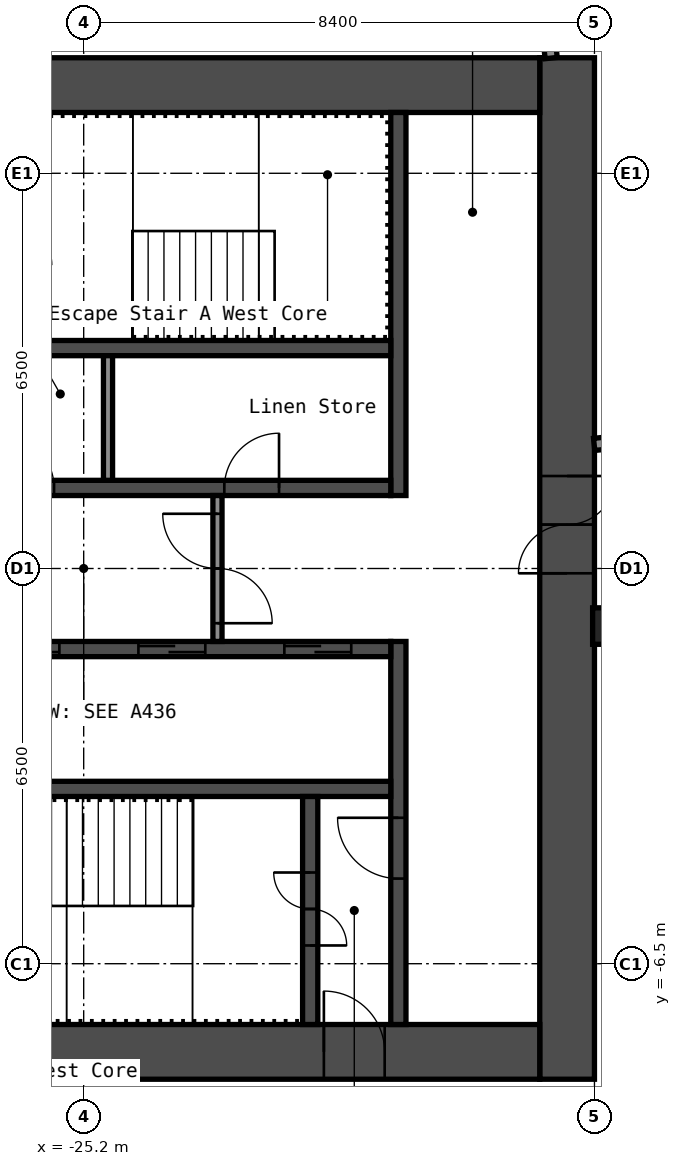
"""IFC4 building model, lengths in metres.
Left out: names, types, materials, properties, quantities, classifications, styles, units other than length and angle.
Written with IfcOpenShell. Run it as: python <this file> out.ifc"""

import sys

from ifc_helpers import new_model, si_unit, direction, frame, frame_2d, origin, origin_2d, place, context, subcontext, project, spatial, rectangle, hollow_rectangle, extrude, element, fill, save


model = new_model("IFC4")
c1 = context("Model", 3, precision=1e-05, world=origin(), true_north=direction((0.0, 1.0)))
c2 = subcontext(c1, "Body", "Model", "MODEL_VIEW")
j1 = project(units=[si_unit("LENGTHUNIT", "METRE"), si_unit("PLANEANGLEUNIT", "RADIAN")], contexts=[c1])
p1 = place(None, origin())
s1 = spatial("IfcSite", under=j1, at=p1, CompositionType="ELEMENT")
p2 = place(p1, origin())
s2 = spatial("IfcBuilding", under=s1, at=p2, CompositionType="ELEMENT")
p3 = place(p2, frame((0.0, 0.0, 248.6)))
s3 = spatial("IfcBuildingStorey", under=s2, at=p3, CompositionType="ELEMENT", Elevation=248.6)
p4 = place(p3, frame((-16.53, -0.947, 0.0), z_axis=(0.0, 0.0, 1.0), x_axis=(1.0, 0.0, 0.0)))
e1 = element("IfcColumn", 1, at=p4, inside=s3, PredefinedType="COLUMN", context=c2, shape_type="SweptSolid", body=[
    extrude(hollow_rectangle(XDim=0.6, YDim=0.6, WallThickness=0.025, InnerFilletRadius=0.038, OuterFilletRadius=0.062, at=origin_2d()), origin(), (0.0, 0.0, 1.0), 2.75),
])
p5 = place(p3, frame((-17.25, -8.4, 0.0), z_axis=(0.0, 0.0, 1.0), x_axis=(0.0, 1.0, 0.0)))
e2 = element("IfcWall", 2, at=p5, inside=s3, PredefinedType="SHEAR", context=c2, shape_type="SweptSolid", body=[
    extrude(rectangle(XDim=16.8, YDim=0.9, at=frame_2d((8.4, 0.0))), origin(), (0.0, 0.0, 1.0), 2.75),
])
p6 = place(p5, frame((8.321, 0.0, 0.0)))
e3 = element("IfcOpeningElement", 3, at=p6, cuts=e2, PredefinedType="OPENING", context=c2, shape_type="SweptSolid", body=[
    extrude(rectangle(XDim=1.6, YDim=2.1, at=frame_2d((0.8, 1.05))), frame((0.0, 0.46, 0.0), z_axis=(0.0, -1.0, 0.0), x_axis=(1.0, 0.0, 0.0)), (0.0, 0.0, 1.0), 0.92),
])
p7 = place(p3, frame((-32.7, 7.95, 0.0), z_axis=(0.0, 0.0, 1.0), x_axis=(1.0, 0.0, 0.0)))
e4 = element("IfcWall", 4, at=p7, inside=s3, PredefinedType="SHEAR", context=c2, shape_type="SweptSolid", body=[
    extrude(rectangle(XDim=15.0, YDim=0.9, at=frame_2d((7.5, 0.0))), origin(), (0.0, 0.0, 1.0), 2.75),
])
p8 = place(p7, frame((3.4, 0.0, 0.0)))
e5 = element("IfcOpeningElement", 5, at=p8, cuts=e4, PredefinedType="OPENING", context=c2, shape_type="SweptSolid", body=[
    extrude(rectangle(XDim=1.2, YDim=2.1, at=frame_2d((0.6, 1.05))), frame((0.0, 0.46, 0.0), z_axis=(0.0, -1.0, 0.0), x_axis=(1.0, 0.0, 0.0)), (0.0, 0.0, 1.0), 0.92),
])
p9 = place(p7, frame((0.75, 0.0, 0.0)))
e6 = element("IfcOpeningElement", 6, at=p9, cuts=e4, PredefinedType="OPENING", context=c2, shape_type="SweptSolid", body=[
    extrude(rectangle(XDim=0.9, YDim=2.1, at=frame_2d((0.45, 1.05))), frame((0.0, 0.46, 0.0), z_axis=(0.0, -1.0, 0.0), x_axis=(1.0, 0.0, 0.0)), (0.0, 0.0, 1.0), 0.92),
])
p10 = place(p3, frame((-32.7, -7.95, 0.0), z_axis=(0.0, 0.0, 1.0), x_axis=(1.0, 0.0, 0.0)))
e7 = element("IfcWall", 7, at=p10, inside=s3, PredefinedType="SHEAR", context=c2, shape_type="SweptSolid", body=[
    extrude(rectangle(XDim=15.0, YDim=0.9, at=frame_2d((7.5, 0.0))), origin(), (0.0, 0.0, 1.0), 2.75),
])
p11 = place(p10, frame((11.45, 0.0, 0.0)))
e8 = element("IfcOpeningElement", 8, at=p11, cuts=e7, PredefinedType="OPENING", context=c2, shape_type="SweptSolid", body=[
    extrude(rectangle(XDim=1.0, YDim=2.1, at=frame_2d((0.5, 1.05))), frame((0.0, 0.46, 0.0), z_axis=(0.0, -1.0, 0.0), x_axis=(1.0, 0.0, 0.0)), (0.0, 0.0, 1.0), 0.92),
])
p12 = place(p3, frame((-20.025, 1.2, 0.0), z_axis=(0.0, 0.0, 1.0), x_axis=(0.0, 1.0, 0.0)))
e9 = element("IfcWall", 9, at=p12, inside=s3, PredefinedType="SHEAR", context=c2, shape_type="SweptSolid", body=[
    extrude(rectangle(XDim=6.3, YDim=0.25, at=frame_2d((3.15, 0.0))), origin(), (0.0, 0.0, 1.0), 2.75),
])
p13 = place(p3, frame((-20.025, -7.5, 0.0), z_axis=(0.0, 0.0, 1.0), x_axis=(0.0, 1.0, 0.0)))
e10 = element("IfcWall", 10, at=p13, inside=s3, PredefinedType="SHEAR", context=c2, shape_type="SweptSolid", body=[
    extrude(rectangle(XDim=6.3, YDim=0.25, at=frame_2d((3.15, 0.0))), origin(), (0.0, 0.0, 1.0), 2.75),
])
p14 = place(p13, frame((2.4, 0.0, 0.0)))
e11 = element("IfcOpeningElement", 11, at=p14, cuts=e10, PredefinedType="OPENING", context=c2, shape_type="SweptSolid", body=[
    extrude(rectangle(XDim=1.0, YDim=2.1, at=frame_2d((0.5, 1.05))), frame((0.0, 0.135, 0.0), z_axis=(0.0, -1.0, 0.0), x_axis=(1.0, 0.0, 0.0)), (0.0, 0.0, 1.0), 0.27),
])
p15 = place(p3, frame((-27.65, 1.325, 0.0), z_axis=(0.0, 0.0, 1.0), x_axis=(1.0, 0.0, 0.0)))
e12 = element("IfcWall", 12, at=p15, inside=s3, PredefinedType="SHEAR", context=c2, shape_type="SweptSolid", body=[
    extrude(rectangle(XDim=7.5, YDim=0.25, at=frame_2d((3.75, 0.0))), origin(), (0.0, 0.0, 1.0), 2.75),
])
p16 = place(p15, frame((4.762, 0.0, 0.0)))
e13 = element("IfcOpeningElement", 13, at=p16, cuts=e12, PredefinedType="OPENING", context=c2, shape_type="SweptSolid", body=[
    extrude(rectangle(XDim=0.9, YDim=2.1, at=frame_2d((0.45, 1.05))), frame((0.0, 0.135, 0.0), z_axis=(0.0, -1.0, 0.0), x_axis=(1.0, 0.0, 0.0)), (0.0, 0.0, 1.0), 0.27),
])
p17 = place(p15, frame((1.062, 0.0, 0.0)))
e14 = element("IfcOpeningElement", 14, at=p17, cuts=e12, PredefinedType="OPENING", context=c2, shape_type="SweptSolid", body=[
    extrude(rectangle(XDim=0.9, YDim=2.1, at=frame_2d((0.45, 1.05))), frame((0.0, 0.135, 0.0), z_axis=(0.0, -1.0, 0.0), x_axis=(1.0, 0.0, 0.0)), (0.0, 0.0, 1.0), 0.27),
])
p18 = place(p3, frame((-27.65, 3.625, 0.0), z_axis=(0.0, 0.0, 1.0), x_axis=(1.0, 0.0, 0.0)))
e15 = element("IfcWall", 15, at=p18, inside=s3, PredefinedType="SHEAR", context=c2, shape_type="SweptSolid", body=[
    extrude(rectangle(XDim=7.5, YDim=0.25, at=frame_2d((3.75, 0.0))), origin(), (0.0, 0.0, 1.0), 2.75),
])
p19 = place(p3, frame((-27.65, -1.325, 0.0), z_axis=(0.0, 0.0, 1.0), x_axis=(1.0, 0.0, 0.0)))
e16 = element("IfcWall", 16, at=p19, inside=s3, PredefinedType="SHEAR", context=c2, shape_type="SweptSolid", body=[
    extrude(rectangle(XDim=7.5, YDim=0.25, at=frame_2d((3.75, 0.0))), origin(), (0.0, 0.0, 1.0), 2.75),
])
p20 = place(p19, frame((5.75, 0.0, 0.0)))
e17 = element("IfcOpeningElement", 17, at=p20, cuts=e16, PredefinedType="OPENING", context=c2, shape_type="SweptSolid", body=[
    extrude(rectangle(XDim=1.1, YDim=2.1, at=frame_2d((0.55, 1.05))), frame((0.0, 0.135, 0.0), z_axis=(0.0, -1.0, 0.0), x_axis=(1.0, 0.0, 0.0)), (0.0, 0.0, 1.0), 0.27),
])
p21 = place(p19, frame((3.35, 0.0, 0.0)))
e18 = element("IfcOpeningElement", 18, at=p21, cuts=e16, PredefinedType="OPENING", context=c2, shape_type="SweptSolid", body=[
    extrude(rectangle(XDim=1.1, YDim=2.1, at=frame_2d((0.55, 1.05))), frame((0.0, 0.135, 0.0), z_axis=(0.0, -1.0, 0.0), x_axis=(1.0, 0.0, 0.0)), (0.0, 0.0, 1.0), 0.27),
])
p22 = place(p19, frame((0.95, 0.0, 0.0)))
e19 = element("IfcOpeningElement", 19, at=p22, cuts=e16, PredefinedType="OPENING", context=c2, shape_type="SweptSolid", body=[
    extrude(rectangle(XDim=1.1, YDim=2.1, at=frame_2d((0.55, 1.05))), frame((0.0, 0.135, 0.0), z_axis=(0.0, -1.0, 0.0), x_axis=(1.0, 0.0, 0.0)), (0.0, 0.0, 1.0), 0.27),
])
p23 = place(p3, frame((-27.65, -3.625, 0.0), z_axis=(0.0, 0.0, 1.0), x_axis=(1.0, 0.0, 0.0)))
e20 = element("IfcWall", 20, at=p23, inside=s3, PredefinedType="SHEAR", context=c2, shape_type="SweptSolid", body=[
    extrude(rectangle(XDim=7.5, YDim=0.25, at=frame_2d((3.75, 0.0))), origin(), (0.0, 0.0, 1.0), 2.75),
])
p24 = place(p3, frame((-21.475, -7.5, 0.0), z_axis=(0.0, 0.0, 1.0), x_axis=(0.0, 1.0, 0.0)))
e21 = element("IfcWall", 21, at=p24, inside=s3, PredefinedType="SHEAR", context=c2, shape_type="SweptSolid", body=[
    extrude(rectangle(XDim=3.75, YDim=0.25, at=frame_2d((1.875, 0.0))), origin(), (0.0, 0.0, 1.0), 2.75),
])
p25 = place(p24, frame((1.3, 0.0, 0.0)))
e22 = element("IfcOpeningElement", 22, at=p25, cuts=e21, PredefinedType="OPENING", context=c2, shape_type="SweptSolid", body=[
    extrude(rectangle(XDim=1.2, YDim=2.1, at=frame_2d((0.6, 1.05))), frame((0.0, 0.135, 0.0), z_axis=(0.0, -1.0, 0.0), x_axis=(1.0, 0.0, 0.0)), (0.0, 0.0, 1.0), 0.27),
])
p26 = place(p3, frame((-23.0, -1.2, 0.0), z_axis=(0.0, 0.0, 1.0), x_axis=(0.0, 1.0, 0.0)))
e23 = element("IfcWall", 23, at=p26, inside=s3, PredefinedType="PARTITIONING", context=c2, shape_type="SweptSolid", body=[
    extrude(rectangle(XDim=2.4, YDim=0.15, at=frame_2d((1.2, 0.0))), origin(), (0.0, 0.0, 1.0), 2.75),
])
p27 = place(p26, frame((0.3, 0.0, 0.0)))
e24 = element("IfcOpeningElement", 24, at=p27, cuts=e23, PredefinedType="OPENING", context=c2, shape_type="SweptSolid", body=[
    extrude(rectangle(XDim=1.8, YDim=2.1, at=frame_2d((0.9, 1.05))), frame((0.0, 0.085, 0.0), z_axis=(0.0, -1.0, 0.0), x_axis=(1.0, 0.0, 0.0)), (0.0, 0.0, 1.0), 0.17),
])
p28 = place(p3, frame((-24.8, 1.45, 0.0), z_axis=(0.0, 0.0, 1.0), x_axis=(0.0, 1.0, 0.0)))
e25 = element("IfcWall", 25, at=p28, inside=s3, PredefinedType="PARTITIONING", context=c2, shape_type="SweptSolid", body=[
    extrude(rectangle(XDim=2.05, YDim=0.15, at=frame_2d((1.025, 0.0))), origin(), (0.0, 0.0, 1.0), 2.75),
])
p29 = place(p3, frame((-16.805, 2.041, 0.0), z_axis=(0.0, 0.0, 1.0), x_axis=(0.994521146831, 0.104535584879, 0.0)))
e26 = element("IfcWall", 26, at=p29, inside=s3, PredefinedType="PARTITIONING", context=c2, shape_type="SweptSolid", body=[
    extrude(rectangle(XDim=33.561, YDim=0.2, at=frame_2d((16.78, 0.0))), origin(), (0.0, 0.0, 1.0), 2.75),
])
p30 = place(p29, frame((3.661, 0.0, 0.0)))
e27 = element("IfcOpeningElement", 27, at=p30, cuts=e26, PredefinedType="OPENING", context=c2, shape_type="SweptSolid", body=[
    extrude(rectangle(XDim=1.0, YDim=2.1, at=frame_2d((0.5, 1.05))), frame((0.0, 0.11, 0.0), z_axis=(0.0, -1.0, 0.0), x_axis=(1.0, 0.0, 0.0)), (0.0, 0.0, 1.0), 0.22),
])
p31 = place(p29, frame((13.761, 0.0, 0.0)))
e28 = element("IfcOpeningElement", 28, at=p31, cuts=e26, PredefinedType="OPENING", context=c2, shape_type="SweptSolid", body=[
    extrude(rectangle(XDim=1.0, YDim=2.1, at=frame_2d((0.5, 1.05))), frame((0.0, 0.11, 0.0), z_axis=(0.0, -1.0, 0.0), x_axis=(1.0, 0.0, 0.0)), (0.0, 0.0, 1.0), 0.22),
])
p32 = place(p29, frame((19.611, 0.0, 0.0)))
e29 = element("IfcOpeningElement", 29, at=p32, cuts=e26, PredefinedType="OPENING", context=c2, shape_type="SweptSolid", body=[
    extrude(rectangle(XDim=1.0, YDim=2.1, at=frame_2d((0.5, 1.05))), frame((0.0, 0.11, 0.0), z_axis=(0.0, -1.0, 0.0), x_axis=(1.0, 0.0, 0.0)), (0.0, 0.0, 1.0), 0.22),
])
p33 = place(p29, frame((21.311, 0.0, 0.0)))
e30 = element("IfcOpeningElement", 30, at=p33, cuts=e26, PredefinedType="OPENING", context=c2, shape_type="SweptSolid", body=[
    extrude(rectangle(XDim=1.0, YDim=2.1, at=frame_2d((0.5, 1.05))), frame((0.0, 0.11, 0.0), z_axis=(0.0, -1.0, 0.0), x_axis=(1.0, 0.0, 0.0)), (0.0, 0.0, 1.0), 0.22),
])
p34 = place(p29, frame((28.861, 0.0, 0.0)))
e31 = element("IfcOpeningElement", 31, at=p34, cuts=e26, PredefinedType="OPENING", context=c2, shape_type="SweptSolid", body=[
    extrude(rectangle(XDim=1.0, YDim=2.1, at=frame_2d((0.5, 1.05))), frame((0.0, 0.11, 0.0), z_axis=(0.0, -1.0, 0.0), x_axis=(1.0, 0.0, 0.0)), (0.0, 0.0, 1.0), 0.22),
])
p35 = place(p3, frame((-17.512, 8.395, 0.0), z_axis=(0.0, 0.0, 1.0), x_axis=(-0.104524714473, 0.994522289375, 0.0)))
e32 = element("IfcWall", 32, at=p35, inside=s3, PredefinedType="PARTITIONING", context=c2, shape_type="SweptSolid", body=[
    extrude(rectangle(XDim=9.607, YDim=0.2, at=frame_2d((4.803, 0.0))), origin(), (0.0, 0.0, 1.0), 2.75),
])
p36 = place(p6, origin())
e33 = element("IfcDoor", 33, at=p36, inside=s3, OperationType="DOUBLE_DOOR_SINGLE_SWING", PredefinedType="DOOR", context=c2, shape_type="SweptSolid", body=[
    extrude(rectangle(XDim=1.6, YDim=2.1, at=frame_2d((0.8, 1.05))), frame((0.0, 0.025, 0.0), z_axis=(0.0, -1.0, 0.0), x_axis=(1.0, 0.0, 0.0)), (0.0, 0.0, 1.0), 0.05),
])
fill(e3, e33)
p37 = place(p11, origin())
e34 = element("IfcDoor", 34, at=p37, inside=s3, OperationType="SINGLE_SWING_RIGHT", PredefinedType="DOOR", context=c2, shape_type="SweptSolid", body=[
    extrude(rectangle(XDim=1.0, YDim=2.1, at=frame_2d((0.5, 1.05))), frame((0.0, 0.025, 0.0), z_axis=(0.0, -1.0, 0.0), x_axis=(1.0, 0.0, 0.0)), (0.0, 0.0, 1.0), 0.05),
])
fill(e8, e34)
p38 = place(p25, origin())
e35 = element("IfcDoor", 35, at=p38, inside=s3, OperationType="DOUBLE_DOOR_SINGLE_SWING", PredefinedType="DOOR", context=c2, shape_type="SweptSolid", body=[
    extrude(rectangle(XDim=1.2, YDim=2.1, at=frame_2d((0.6, 1.05))), frame((0.0, 0.025, 0.0), z_axis=(0.0, -1.0, 0.0), x_axis=(1.0, 0.0, 0.0)), (0.0, 0.0, 1.0), 0.05),
])
fill(e22, e35)
p39 = place(p14, origin())
e36 = element("IfcDoor", 36, at=p39, inside=s3, OperationType="SINGLE_SWING_LEFT", PredefinedType="DOOR", context=c2, shape_type="SweptSolid", body=[
    extrude(rectangle(XDim=1.0, YDim=2.1, at=frame_2d((0.5, 1.05))), frame((0.0, 0.025, 0.0), z_axis=(0.0, -1.0, 0.0), x_axis=(1.0, 0.0, 0.0)), (0.0, 0.0, 1.0), 0.05),
])
fill(e11, e36)
p40 = place(p27, origin())
e37 = element("IfcDoor", 37, at=p40, inside=s3, OperationType="DOUBLE_DOOR_SINGLE_SWING", PredefinedType="DOOR", context=c2, shape_type="SweptSolid", body=[
    extrude(rectangle(XDim=1.8, YDim=2.1, at=frame_2d((0.9, 1.05))), frame((0.0, 0.025, 0.0), z_axis=(0.0, -1.0, 0.0), x_axis=(1.0, 0.0, 0.0)), (0.0, 0.0, 1.0), 0.05),
])
fill(e24, e37)
p41 = place(p16, origin())
e38 = element("IfcDoor", 38, at=p41, inside=s3, OperationType="SINGLE_SWING_LEFT", PredefinedType="DOOR", context=c2, shape_type="SweptSolid", body=[
    extrude(rectangle(XDim=0.9, YDim=2.1, at=frame_2d((0.45, 1.05))), frame((0.0, 0.025, 0.0), z_axis=(0.0, -1.0, 0.0), x_axis=(1.0, 0.0, 0.0)), (0.0, 0.0, 1.0), 0.05),
])
fill(e13, e38)
p42 = place(p17, origin())
e39 = element("IfcDoor", 39, at=p42, inside=s3, OperationType="SINGLE_SWING_RIGHT", PredefinedType="DOOR", context=c2, shape_type="SweptSolid", body=[
    extrude(rectangle(XDim=0.9, YDim=2.1, at=frame_2d((0.45, 1.05))), frame((0.0, 0.025, 0.0), z_axis=(0.0, -1.0, 0.0), x_axis=(1.0, 0.0, 0.0)), (0.0, 0.0, 1.0), 0.05),
])
fill(e14, e39)
p43 = place(p20, origin())
e40 = element("IfcDoor", 40, at=p43, inside=s3, OperationType="DOUBLE_DOOR_SLIDING", PredefinedType="DOOR", context=c2, shape_type="SweptSolid", body=[
    extrude(rectangle(XDim=1.1, YDim=2.1, at=frame_2d((0.55, 1.05))), frame((0.0, 0.025, 0.0), z_axis=(0.0, -1.0, 0.0), x_axis=(1.0, 0.0, 0.0)), (0.0, 0.0, 1.0), 0.05),
])
fill(e17, e40)
p44 = place(p21, origin())
e41 = element("IfcDoor", 41, at=p44, inside=s3, OperationType="DOUBLE_DOOR_SLIDING", PredefinedType="DOOR", context=c2, shape_type="SweptSolid", body=[
    extrude(rectangle(XDim=1.1, YDim=2.1, at=frame_2d((0.55, 1.05))), frame((0.0, 0.025, 0.0), z_axis=(0.0, -1.0, 0.0), x_axis=(1.0, 0.0, 0.0)), (0.0, 0.0, 1.0), 0.05),
])
fill(e18, e41)
p45 = place(p22, origin())
e42 = element("IfcDoor", 42, at=p45, inside=s3, OperationType="DOUBLE_DOOR_SLIDING", PredefinedType="DOOR", context=c2, shape_type="SweptSolid", body=[
    extrude(rectangle(XDim=1.1, YDim=2.1, at=frame_2d((0.55, 1.05))), frame((0.0, 0.025, 0.0), z_axis=(0.0, -1.0, 0.0), x_axis=(1.0, 0.0, 0.0)), (0.0, 0.0, 1.0), 0.05),
])
fill(e19, e42)
save(model, sys.argv[1])
